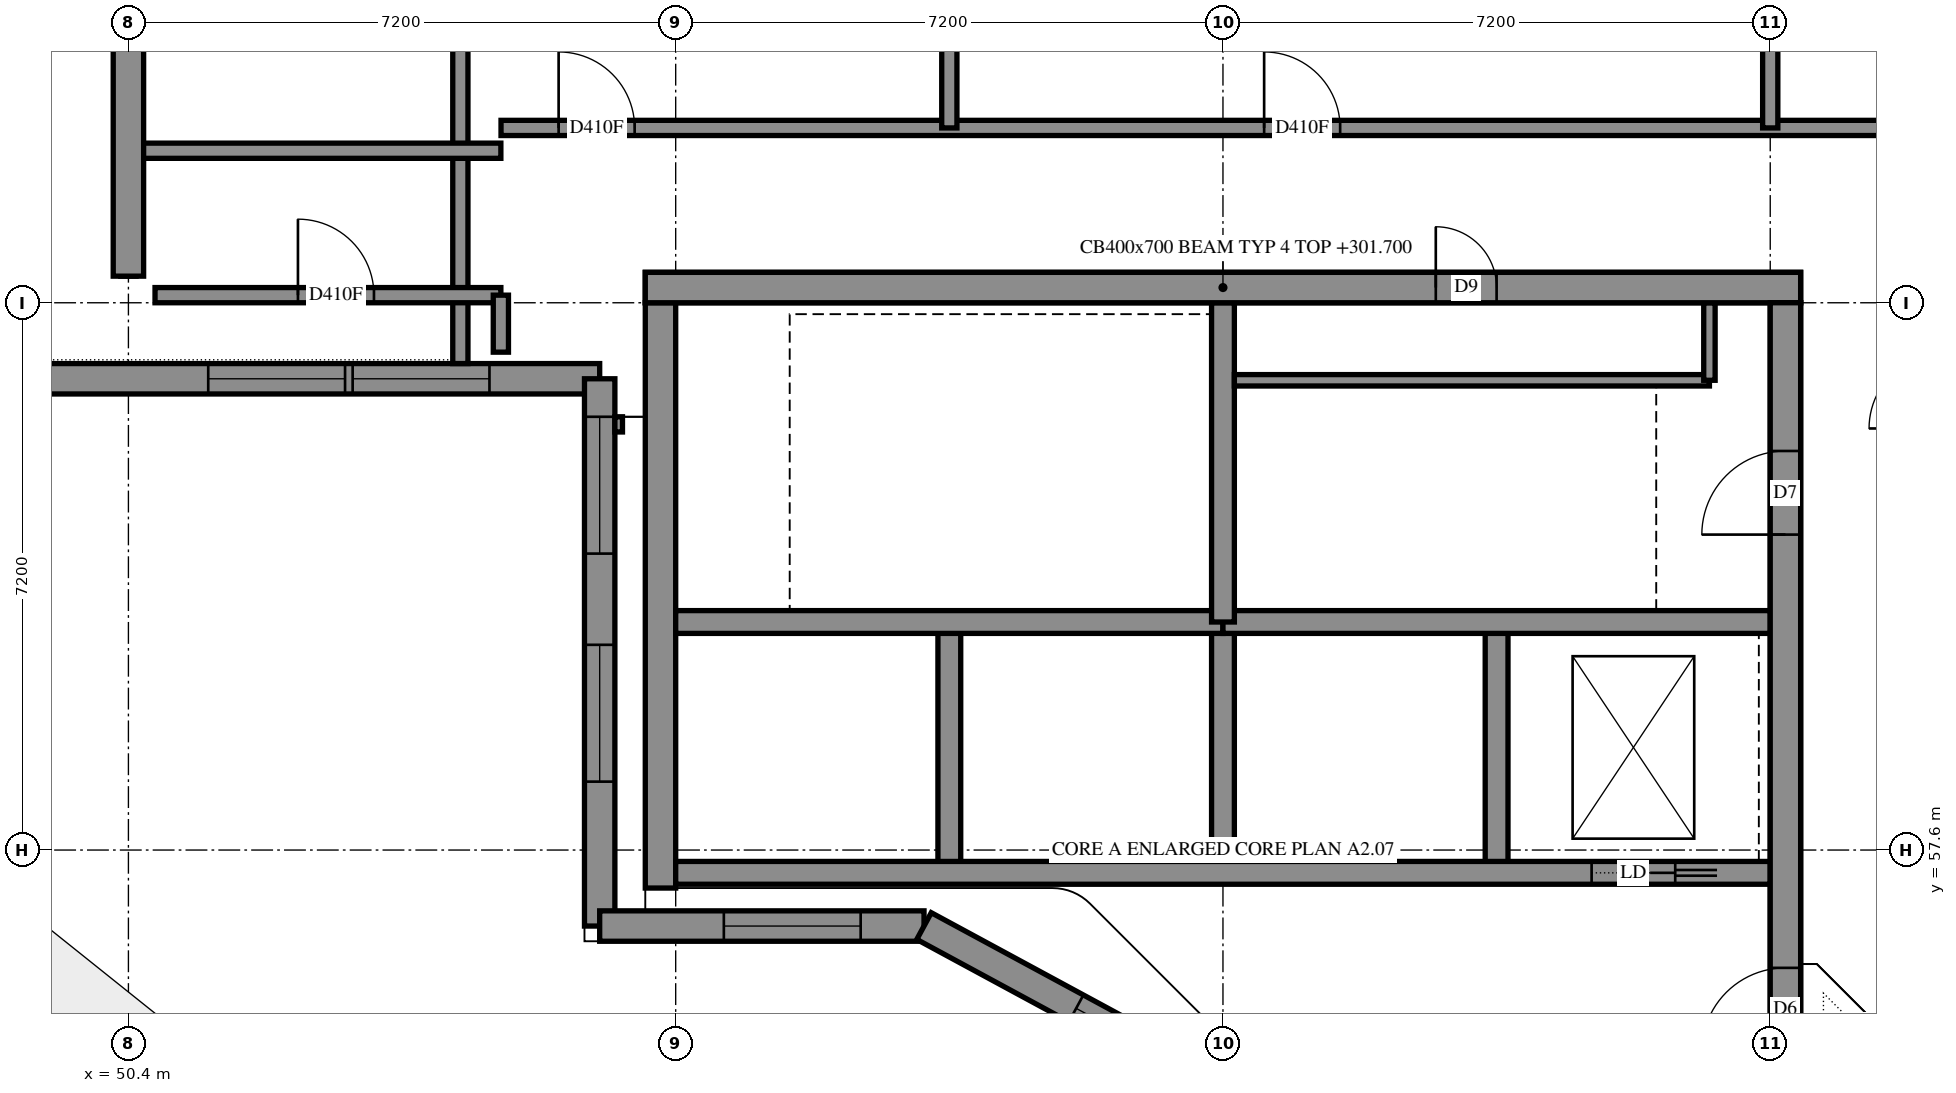
"""IFC4 building model, lengths in metres.
Left out: names, types, materials, properties, quantities, classifications, styles, units other than length and angle.
Written with IfcOpenShell. Run it as: python <this file> out.ifc"""

import sys

from ifc_helpers import new_model, si_unit, direction, frame, frame_2d, origin, place, context, subcontext, project, spatial, polyline, rectangle, outline, extrude, element, fill, save


model = new_model("IFC4")
c1 = context("Model", 3, precision=1e-05, world=origin(), true_north=direction((0.0, 1.0)))
c2 = subcontext(c1, "Body", "Model", "MODEL_VIEW")
j1 = project(units=[si_unit("LENGTHUNIT", "METRE"), si_unit("PLANEANGLEUNIT", "RADIAN")], contexts=[c1])
p1 = place(None, origin())
s1 = spatial("IfcSite", under=j1, at=p1, CompositionType="ELEMENT")
p2 = place(p1, origin())
s2 = spatial("IfcBuilding", under=s1, at=p2, CompositionType="ELEMENT")
p3 = place(p2, frame((0.0, 0.0, 298.2)))
s3 = spatial("IfcBuildingStorey", under=s2, at=p3, CompositionType="ELEMENT", Elevation=298.2)
p4 = place(p3, frame((57.2, 65.0, -0.3), z_axis=(0.0, 0.0, 1.0), x_axis=(1.0, 0.0, 0.0)))
e1 = element("IfcWall", 1, at=p4, inside=s3, PredefinedType="SHEAR", context=c2, shape_type="SweptSolid", body=[
    extrude(outline(polyline([(0.0, 0.0), (15.2, 0.0), (15.2, 3.1), (0.0, 3.1), (0.0, 0.0)])), frame((0.0, 0.2, 0.0), z_axis=(0.0, -1.0, 0.0), x_axis=(1.0, 0.0, 0.0)), (0.0, 0.0, 1.0), 0.4),
])
p5 = place(p4, frame((10.4, 0.0, 0.3)))
e2 = element("IfcOpeningElement", 2, at=p5, cuts=e1, PredefinedType="OPENING", context=c2, shape_type="SweptSolid", body=[
    extrude(rectangle(XDim=0.8, YDim=2.1, at=frame_2d((0.4, 1.05))), frame((0.0, 0.21, 0.0), z_axis=(0.0, -1.0, 0.0), x_axis=(1.0, 0.0, 0.0)), (0.0, 0.0, 1.0), 0.42),
])
p6 = place(p3, frame((57.4, 57.1, -0.3), z_axis=(0.0, 0.0, 1.0), x_axis=(0.0, 1.0, 0.0)))
e3 = element("IfcWall", 3, at=p6, inside=s3, PredefinedType="SHEAR", context=c2, shape_type="SweptSolid", body=[
    extrude(outline(polyline([(0.0, 0.0), (7.7, 0.0), (7.7, 3.1), (0.0, 3.1), (0.0, 0.0)])), frame((0.0, 0.2, 0.0), z_axis=(0.0, -1.0, 0.0), x_axis=(1.0, 0.0, 0.0)), (0.0, 0.0, 1.0), 0.4),
])
p7 = place(p3, frame((72.2, 50.4, -0.3), z_axis=(0.0, 0.0, 1.0), x_axis=(0.0, 1.0, 0.0)))
e4 = element("IfcWall", 4, at=p7, inside=s3, PredefinedType="SHEAR", context=c2, shape_type="SweptSolid", body=[
    extrude(outline(polyline([(0.0, 0.0), (14.4, 0.0), (14.4, 3.1), (0.0, 3.1), (0.0, 0.0)])), frame((0.0, 0.2, 0.0), z_axis=(0.0, -1.0, 0.0), x_axis=(1.0, 0.0, 0.0)), (0.0, 0.0, 1.0), 0.4),
])
p8 = place(p7, frame((4.55, 0.0, 0.3)))
e5 = element("IfcOpeningElement", 5, at=p8, cuts=e4, PredefinedType="OPENING", context=c2, shape_type="SweptSolid", body=[
    extrude(rectangle(XDim=1.1, YDim=2.1, at=frame_2d((0.55, 1.05))), frame((0.0, 0.21, 0.0), z_axis=(0.0, -1.0, 0.0), x_axis=(1.0, 0.0, 0.0)), (0.0, 0.0, 1.0), 0.42),
])
p9 = place(p7, frame((11.35, 0.0, 0.3)))
e6 = element("IfcOpeningElement", 6, at=p9, cuts=e4, PredefinedType="OPENING", context=c2, shape_type="SweptSolid", body=[
    extrude(rectangle(XDim=1.1, YDim=2.1, at=frame_2d((0.55, 1.05))), frame((0.0, 0.21, 0.0), z_axis=(0.0, -1.0, 0.0), x_axis=(1.0, 0.0, 0.0)), (0.0, 0.0, 1.0), 0.42),
])
for number, where, z_axis, x_axis in (
    (7, (61.2, 57.3, 0.0), (0.0, 0.0, 1.0), (0.0, 1.0, 0.0)),
    (8, (64.8, 57.3, 0.0), (0.0, 0.0, 1.0), (0.0, 1.0, 0.0)),
    (9, (68.4, 57.3, 0.0), (0.0, 0.0, 1.0), (0.0, 1.0, 0.0)),
):
    element("IfcWall", number, at=place(p3, frame(where, z_axis=z_axis, x_axis=x_axis)), inside=s3, PredefinedType="SOLIDWALL", context=c2, shape_type="SweptSolid", body=[
        extrude(outline(polyline([(0.0, 0.0), (3.3, 0.0), (3.3, 3.5), (0.0, 3.5), (0.0, 0.0)])), frame((0.0, 0.15, 0.0), z_axis=(0.0, -1.0, 0.0), x_axis=(1.0, 0.0, 0.0)), (0.0, 0.0, 1.0), 0.3),
    ])
p10 = place(p3, frame((57.6, 57.3, 0.0), z_axis=(0.0, 0.0, 1.0), x_axis=(1.0, 0.0, 0.0)))
e10 = element("IfcWall", 10, at=p10, inside=s3, PredefinedType="SOLIDWALL", context=c2, shape_type="SweptSolid", body=[
    extrude(outline(polyline([(0.0, 0.0), (14.4, 0.0), (14.4, 3.5), (0.0, 3.5), (0.0, 0.0)])), frame((0.0, 0.15, 0.0), z_axis=(0.0, -1.0, 0.0), x_axis=(1.0, 0.0, 0.0)), (0.0, 0.0, 1.0), 0.3),
])
p11 = place(p10, frame((12.05, 0.0, 0.0)))
e11 = element("IfcOpeningElement", 11, at=p11, cuts=e10, PredefinedType="OPENING", context=c2, shape_type="SweptSolid", body=[
    extrude(rectangle(XDim=1.1, YDim=2.1, at=frame_2d((0.55, 1.05))), frame((0.0, 0.16, 0.0), z_axis=(0.0, -1.0, 0.0), x_axis=(1.0, 0.0, 0.0)), (0.0, 0.0, 1.0), 0.32),
])
for number, where, z_axis, x_axis in (
    (12, (57.6, 60.6, 0.0), (0.0, 0.0, 1.0), (1.0, 0.0, 0.0)),
    (13, (64.8, 60.6, 0.0), (0.0, 0.0, 1.0), (1.0, 0.0, 0.0)),
):
    element("IfcWall", number, at=place(p3, frame(where, z_axis=z_axis, x_axis=x_axis)), inside=s3, PredefinedType="SOLIDWALL", context=c2, shape_type="SweptSolid", body=[
        extrude(outline(polyline([(0.0, 0.0), (7.2, 0.0), (7.2, 3.5), (0.0, 3.5), (0.0, 0.0)])), frame((0.0, 0.15, 0.0), z_axis=(0.0, -1.0, 0.0), x_axis=(1.0, 0.0, 0.0)), (0.0, 0.0, 1.0), 0.3),
    ])
p12 = place(p3, frame((64.8, 60.6, 0.0), z_axis=(0.0, 0.0, 1.0), x_axis=(0.0, 1.0, 0.0)))
e14 = element("IfcWall", 14, at=p12, inside=s3, PredefinedType="SOLIDWALL", context=c2, shape_type="SweptSolid", body=[
    extrude(outline(polyline([(0.0, 0.0), (4.2, 0.0), (4.2, 3.5), (0.0, 3.5), (0.0, 0.0)])), frame((0.0, 0.15, 0.0), z_axis=(0.0, -1.0, 0.0), x_axis=(1.0, 0.0, 0.0)), (0.0, 0.0, 1.0), 0.3),
])
p13 = place(p3, frame((48.167, 63.8, 0.0), z_axis=(0.0, 0.0, 1.0), x_axis=(1.0, 0.0, 0.0)))
e15 = element("IfcWall", 15, at=p13, inside=s3, PredefinedType="SOLIDWALL", context=c2, shape_type="SweptSolid", body=[
    extrude(outline(polyline([(-0.2, -0.2), (8.233, -0.2), (8.233, 0.2), (0.2, 0.2), (-0.2, -0.2)])), origin(), (0.0, 0.0, 1.0), 3.5),
])
p14 = place(p13, frame((3.283, 0.0, 0.7)))
e16 = element("IfcOpeningElement", 16, at=p14, cuts=e15, PredefinedType="OPENING", context=c2, shape_type="SweptSolid", body=[
    extrude(rectangle(XDim=1.8, YDim=2.2, at=frame_2d((0.9, 1.1))), frame((0.0, 0.21, 0.0), z_axis=(0.0, -1.0, 0.0), x_axis=(1.0, 0.0, 0.0)), (0.0, 0.0, 1.0), 0.42),
])
p15 = place(p13, frame((5.183, 0.0, 0.7)))
e17 = element("IfcOpeningElement", 17, at=p15, cuts=e15, PredefinedType="OPENING", context=c2, shape_type="SweptSolid", body=[
    extrude(rectangle(XDim=1.8, YDim=2.2, at=frame_2d((0.9, 1.1))), frame((0.0, 0.21, 0.0), z_axis=(0.0, -1.0, 0.0), x_axis=(1.0, 0.0, 0.0)), (0.0, 0.0, 1.0), 0.42),
])
p16 = place(p3, frame((56.6, 63.8, 0.0), z_axis=(0.0, 0.0, 1.0), x_axis=(0.0, -1.0, 0.0)))
e18 = element("IfcWall", 18, at=p16, inside=s3, PredefinedType="SOLIDWALL", context=c2, shape_type="SweptSolid", body=[
    extrude(outline(polyline([(-0.2, -0.2), (7.4, -0.2), (7.0, 0.2), (-0.2, 0.2), (-0.2, -0.2)])), origin(), (0.0, 0.0, 1.0), 3.5),
])
p17 = place(p16, frame((0.5, 0.0, 0.7)))
e19 = element("IfcOpeningElement", 19, at=p17, cuts=e18, PredefinedType="OPENING", context=c2, shape_type="SweptSolid", body=[
    extrude(rectangle(XDim=1.8, YDim=2.2, at=frame_2d((0.9, 1.1))), frame((0.0, 0.21, 0.0), z_axis=(0.0, -1.0, 0.0), x_axis=(1.0, 0.0, 0.0)), (0.0, 0.0, 1.0), 0.42),
])
p18 = place(p16, frame((3.5, 0.0, 0.7)))
e20 = element("IfcOpeningElement", 20, at=p18, cuts=e18, PredefinedType="OPENING", context=c2, shape_type="SweptSolid", body=[
    extrude(rectangle(XDim=1.8, YDim=2.2, at=frame_2d((0.9, 1.1))), frame((0.0, 0.21, 0.0), z_axis=(0.0, -1.0, 0.0), x_axis=(1.0, 0.0, 0.0)), (0.0, 0.0, 1.0), 0.42),
])
p19 = place(p3, frame((56.6, 56.6, 0.0), z_axis=(0.0, 0.0, 1.0), x_axis=(1.0, 0.0, 0.0)))
e21 = element("IfcWall", 21, at=p19, inside=s3, PredefinedType="SOLIDWALL", context=c2, shape_type="SweptSolid", body=[
    extrude(outline(polyline([(-0.2, -0.2), (4.216, -0.2), (4.318, 0.2), (0.2, 0.2), (-0.2, -0.2)])), origin(), (0.0, 0.0, 1.0), 3.5),
])
p20 = place(p19, frame((1.633, 0.0, 0.7)))
e22 = element("IfcOpeningElement", 22, at=p20, cuts=e21, PredefinedType="OPENING", context=c2, shape_type="SweptSolid", body=[
    extrude(rectangle(XDim=1.8, YDim=2.2, at=frame_2d((0.9, 1.1))), frame((0.0, 0.21, 0.0), z_axis=(0.0, -1.0, 0.0), x_axis=(1.0, 0.0, 0.0)), (0.0, 0.0, 1.0), 0.42),
])
p21 = place(p3, frame((60.867, 56.6, 0.0), z_axis=(0.0, 0.0, 1.0), x_axis=(0.8795817564, -0.4757477628, 0.0)))
e23 = element("IfcWall", 23, at=p21, inside=s3, PredefinedType="SOLIDWALL", context=c2, shape_type="SweptSolid", body=[
    extrude(outline(polyline([(0.051, -0.2), (4.358, -0.2), (4.416, 0.2), (-0.051, 0.2), (0.051, -0.2)])), origin(), (0.0, 0.0, 1.0), 3.5),
])
p22 = place(p21, frame((2.276, 0.0, 0.7)))
e24 = element("IfcOpeningElement", 24, at=p22, cuts=e23, PredefinedType="OPENING", context=c2, shape_type="SweptSolid", body=[
    extrude(rectangle(XDim=1.8, YDim=2.2, at=frame_2d((0.9, 1.1))), frame((0.0, 0.21, 0.0), z_axis=(0.0, -1.0, 0.0), x_axis=(1.0, 0.0, 0.0)), (0.0, 0.0, 1.0), 0.42),
])
p23 = place(p3, frame((54.767, 64.0, 0.0), z_axis=(0.0, 0.0, 1.0), x_axis=(0.0, 1.0, 0.0)))
e25 = element("IfcWall", 25, at=p23, inside=s3, PredefinedType="PARAPET", context=c2, shape_type="SweptSolid", body=[
    extrude(outline(polyline([(0.0, -0.1), (8.8, -0.1), (8.8, 0.1), (0.0, 0.1), (0.0, -0.1)])), origin(), (0.0, 0.0, 1.0), 0.25),
])
p24 = place(p3, frame((56.9, 63.2, 0.0), z_axis=(0.0, 0.0, 1.0), x_axis=(-1.0, 0.0, 0.0)))
e26 = element("IfcWall", 26, at=p24, inside=s3, PredefinedType="PARAPET", context=c2, shape_type="SweptSolid", body=[
    extrude(outline(polyline([(0.0, -0.1), (0.1, -0.1), (0.1, 0.1), (0.0, 0.1), (0.0, -0.1)])), origin(), (0.0, 0.0, 1.0), 0.25),
])
p25 = place(p3, frame((64.95, 63.78, 0.0), z_axis=(0.0, 0.0, 1.0), x_axis=(1.0, 0.0, 0.0)))
e27 = element("IfcWall", 27, at=p25, inside=s3, PredefinedType="PARTITIONING", context=c2, shape_type="SweptSolid", body=[
    extrude(outline(polyline([(0.0, 0.0), (6.25, 0.0), (6.25, 3.5), (0.0, 3.5), (0.0, 0.0)])), frame((0.0, 0.075, 0.0), z_axis=(0.0, -1.0, 0.0), x_axis=(1.0, 0.0, 0.0)), (0.0, 0.0, 1.0), 0.15),
])
p26 = place(p3, frame((71.2, 63.78, 0.0), z_axis=(0.0, 0.0, 1.0), x_axis=(0.0, 1.0, 0.0)))
e28 = element("IfcWall", 28, at=p26, inside=s3, PredefinedType="PARTITIONING", context=c2, shape_type="SweptSolid", body=[
    extrude(outline(polyline([(0.0, 0.0), (1.02, 0.0), (1.02, 3.5), (0.0, 3.5), (0.0, 0.0)])), frame((0.0, 0.075, 0.0), z_axis=(0.0, -1.0, 0.0), x_axis=(1.0, 0.0, 0.0)), (0.0, 0.0, 1.0), 0.15),
])
p27 = place(p3, frame((55.302, 67.1, 0.0), z_axis=(0.0, 0.0, 1.0), x_axis=(1.0, 0.0, 0.0)))
e29 = element("IfcWall", 29, at=p27, inside=s3, PredefinedType="PARTITIONING", context=c2, shape_type="SweptSolid", body=[
    extrude(rectangle(XDim=18.998, YDim=0.2, at=frame_2d((9.499, 0.0))), origin(), (0.0, 0.0, 1.0), 3.5),
])
p28 = place(p27, frame((0.758, 0.0, 0.0)))
e30 = element("IfcOpeningElement", 30, at=p28, cuts=e29, PredefinedType="OPENING", context=c2, shape_type="SweptSolid", body=[
    extrude(rectangle(XDim=1.0, YDim=2.1, at=frame_2d((0.5, 1.05))), frame((0.0, 0.11, 0.0), z_axis=(0.0, -1.0, 0.0), x_axis=(1.0, 0.0, 0.0)), (0.0, 0.0, 1.0), 0.22),
])
p29 = place(p27, frame((10.04, 0.0, 0.0)))
e31 = element("IfcOpeningElement", 31, at=p29, cuts=e29, PredefinedType="OPENING", context=c2, shape_type="SweptSolid", body=[
    extrude(rectangle(XDim=1.0, YDim=2.1, at=frame_2d((0.5, 1.05))), frame((0.0, 0.11, 0.0), z_axis=(0.0, -1.0, 0.0), x_axis=(1.0, 0.0, 0.0)), (0.0, 0.0, 1.0), 0.22),
])
p30 = place(p3, frame((50.4, 66.8, 0.0), z_axis=(0.0, 0.0, 1.0), x_axis=(1.0, 0.0, 0.0)))
e32 = element("IfcWall", 32, at=p30, inside=s3, PredefinedType="PARTITIONING", context=c2, shape_type="SweptSolid", body=[
    extrude(rectangle(XDim=4.9, YDim=0.2, at=frame_2d((2.45, 0.0))), origin(), (0.0, 0.0, 1.0), 3.5),
])
p31 = place(p3, frame((50.4, 66.8, 0.0), z_axis=(0.0, 0.0, 1.0), x_axis=(0.0, 1.0, 0.0)))
e33 = element("IfcWall", 33, at=p31, inside=s3, PredefinedType="PARTITIONING", context=c2, shape_type="SweptSolid", body=[
    extrude(rectangle(XDim=5.55, YDim=0.2, at=frame_2d((2.775, 0.0))), origin(), (0.0, 0.0, 1.0), 3.5),
])
p32 = place(p3, frame((72.0, 67.1, 0.0), z_axis=(0.0, 0.0, 1.0), x_axis=(0.0, 1.0, 0.0)))
e34 = element("IfcWall", 34, at=p32, inside=s3, PredefinedType="PARTITIONING", context=c2, shape_type="SweptSolid", body=[
    extrude(rectangle(XDim=5.25, YDim=0.2, at=frame_2d((2.625, 0.0))), origin(), (0.0, 0.0, 1.0), 3.5),
])
p33 = place(p3, frame((50.75, 64.9, 0.0), z_axis=(0.0, 0.0, 1.0), x_axis=(1.0, 0.0, 0.0)))
e35 = element("IfcWall", 35, at=p33, inside=s3, PredefinedType="PARTITIONING", context=c2, shape_type="SweptSolid", body=[
    extrude(rectangle(XDim=4.55, YDim=0.2, at=frame_2d((2.275, 0.0))), origin(), (0.0, 0.0, 1.0), 3.5),
])
p34 = place(p33, frame((1.88, 0.0, 0.0)))
e36 = element("IfcOpeningElement", 36, at=p34, cuts=e35, PredefinedType="OPENING", context=c2, shape_type="SweptSolid", body=[
    extrude(rectangle(XDim=1.0, YDim=2.1, at=frame_2d((0.5, 1.05))), frame((0.0, 0.11, 0.0), z_axis=(0.0, -1.0, 0.0), x_axis=(1.0, 0.0, 0.0)), (0.0, 0.0, 1.0), 0.22),
])
p35 = place(p3, frame((50.4, 65.15, 0.0), z_axis=(0.0, 0.0, 1.0), x_axis=(0.0, 1.0, 0.0)))
e37 = element("IfcWall", 37, at=p35, inside=s3, PredefinedType="PARTITIONING", context=c2, shape_type="SweptSolid", body=[
    extrude(rectangle(XDim=1.65, YDim=0.2, at=frame_2d((0.825, 0.0))), origin(), (0.0, 0.0, 1.0), 3.5),
])
p36 = place(p3, frame((55.3, 64.15, 0.0), z_axis=(0.0, 0.0, 1.0), x_axis=(0.0, 1.0, 0.0)))
e38 = element("IfcWall", 38, at=p36, inside=s3, PredefinedType="PARTITIONING", context=c2, shape_type="SweptSolid", body=[
    extrude(rectangle(XDim=0.75, YDim=0.2, at=frame_2d((0.375, 0.0))), origin(), (0.0, 0.0, 1.0), 3.5),
])
p37 = place(p3, frame((61.2, 67.1, 0.0), z_axis=(0.0, 0.0, 1.0), x_axis=(0.0, 1.0, 0.0)))
e39 = element("IfcWall", 39, at=p37, inside=s3, PredefinedType="PARTITIONING", context=c2, shape_type="SweptSolid", body=[
    extrude(outline(polyline([(0.0, -0.1), (5.7, -0.1), (5.7, 0.1), (0.0, 0.1), (0.0, -0.1)])), origin(), (0.0, 0.0, 1.0), 3.5),
])
p38 = place(p14, origin())
e40 = element("IfcWindow", 40, at=p38, inside=s3, PartitioningType="SINGLE_PANEL", PredefinedType="WINDOW", context=c2, shape_type="SweptSolid", body=[
    extrude(rectangle(XDim=1.8, YDim=2.2, at=frame_2d((0.9, 1.1))), frame((0.0, 0.08, 0.0), z_axis=(0.0, -1.0, 0.0), x_axis=(1.0, 0.0, 0.0)), (0.0, 0.0, 1.0), 0.06),
])
fill(e16, e40)
p39 = place(p15, origin())
e41 = element("IfcWindow", 41, at=p39, inside=s3, PartitioningType="SINGLE_PANEL", PredefinedType="WINDOW", context=c2, shape_type="SweptSolid", body=[
    extrude(rectangle(XDim=1.8, YDim=2.2, at=frame_2d((0.9, 1.1))), frame((0.0, 0.08, 0.0), z_axis=(0.0, -1.0, 0.0), x_axis=(1.0, 0.0, 0.0)), (0.0, 0.0, 1.0), 0.06),
])
fill(e17, e41)
p40 = place(p17, origin())
e42 = element("IfcWindow", 42, at=p40, inside=s3, PartitioningType="SINGLE_PANEL", PredefinedType="WINDOW", context=c2, shape_type="SweptSolid", body=[
    extrude(rectangle(XDim=1.8, YDim=2.2, at=frame_2d((0.9, 1.1))), frame((0.0, 0.08, 0.0), z_axis=(0.0, -1.0, 0.0), x_axis=(1.0, 0.0, 0.0)), (0.0, 0.0, 1.0), 0.06),
])
fill(e19, e42)
p41 = place(p18, origin())
e43 = element("IfcWindow", 43, at=p41, inside=s3, PartitioningType="SINGLE_PANEL", PredefinedType="WINDOW", context=c2, shape_type="SweptSolid", body=[
    extrude(rectangle(XDim=1.8, YDim=2.2, at=frame_2d((0.9, 1.1))), frame((0.0, 0.08, 0.0), z_axis=(0.0, -1.0, 0.0), x_axis=(1.0, 0.0, 0.0)), (0.0, 0.0, 1.0), 0.06),
])
fill(e20, e43)
p42 = place(p20, origin())
e44 = element("IfcWindow", 44, at=p42, inside=s3, PartitioningType="SINGLE_PANEL", PredefinedType="WINDOW", context=c2, shape_type="SweptSolid", body=[
    extrude(rectangle(XDim=1.8, YDim=2.2, at=frame_2d((0.9, 1.1))), frame((0.0, 0.08, 0.0), z_axis=(0.0, -1.0, 0.0), x_axis=(1.0, 0.0, 0.0)), (0.0, 0.0, 1.0), 0.06),
])
fill(e22, e44)
p43 = place(p22, origin())
e45 = element("IfcWindow", 45, at=p43, inside=s3, PartitioningType="SINGLE_PANEL", PredefinedType="WINDOW", context=c2, shape_type="SweptSolid", body=[
    extrude(rectangle(XDim=1.8, YDim=2.2, at=frame_2d((0.9, 1.1))), frame((0.0, 0.08, 0.0), z_axis=(0.0, -1.0, 0.0), x_axis=(1.0, 0.0, 0.0)), (0.0, 0.0, 1.0), 0.06),
])
fill(e24, e45)
p44 = place(p5, origin())
e46 = element("IfcDoor", 46, at=p44, inside=s3, OperationType="SINGLE_SWING_RIGHT", PredefinedType="DOOR", context=c2, shape_type="SweptSolid", body=[
    extrude(rectangle(XDim=0.8, YDim=2.1, at=frame_2d((0.4, 1.05))), frame((0.0, 0.025, 0.0), z_axis=(0.0, -1.0, 0.0), x_axis=(1.0, 0.0, 0.0)), (0.0, 0.0, 1.0), 0.05),
])
fill(e2, e46)
p45 = place(p8, origin())
e47 = element("IfcDoor", 47, at=p45, inside=s3, OperationType="DOUBLE_DOOR_SINGLE_SWING", PredefinedType="DOOR", context=c2, shape_type="SweptSolid", body=[
    extrude(rectangle(XDim=1.1, YDim=2.1, at=frame_2d((0.55, 1.05))), frame((0.0, 0.025, 0.0), z_axis=(0.0, -1.0, 0.0), x_axis=(1.0, 0.0, 0.0)), (0.0, 0.0, 1.0), 0.05),
])
fill(e5, e47)
p46 = place(p9, origin())
e48 = element("IfcDoor", 48, at=p46, inside=s3, OperationType="SINGLE_SWING_RIGHT", PredefinedType="DOOR", context=c2, shape_type="SweptSolid", body=[
    extrude(rectangle(XDim=1.1, YDim=2.1, at=frame_2d((0.55, 1.05))), frame((0.0, 0.025, 0.0), z_axis=(0.0, -1.0, 0.0), x_axis=(1.0, 0.0, 0.0)), (0.0, 0.0, 1.0), 0.05),
])
fill(e6, e48)
p47 = place(p11, origin())
e49 = element("IfcDoor", 49, at=p47, inside=s3, OperationType="SLIDING_TO_RIGHT", PredefinedType="DOOR", context=c2, shape_type="SweptSolid", body=[
    extrude(rectangle(XDim=1.1, YDim=2.1, at=frame_2d((0.55, 1.05))), frame((0.0, 0.025, 0.0), z_axis=(0.0, -1.0, 0.0), x_axis=(1.0, 0.0, 0.0)), (0.0, 0.0, 1.0), 0.05),
])
fill(e11, e49)
p48 = place(p34, origin())
e50 = element("IfcDoor", 50, at=p48, inside=s3, OperationType="SINGLE_SWING_RIGHT", PredefinedType="DOOR", context=c2, shape_type="SweptSolid", body=[
    extrude(rectangle(XDim=1.0, YDim=2.1, at=frame_2d((0.5, 1.05))), frame((0.0, 0.025, 0.0), z_axis=(0.0, -1.0, 0.0), x_axis=(1.0, 0.0, 0.0)), (0.0, 0.0, 1.0), 0.05),
])
fill(e36, e50)
p49 = place(p28, origin())
e51 = element("IfcDoor", 51, at=p49, inside=s3, OperationType="SINGLE_SWING_RIGHT", PredefinedType="DOOR", context=c2, shape_type="SweptSolid", body=[
    extrude(rectangle(XDim=1.0, YDim=2.1, at=frame_2d((0.5, 1.05))), frame((0.0, 0.025, 0.0), z_axis=(0.0, -1.0, 0.0), x_axis=(1.0, 0.0, 0.0)), (0.0, 0.0, 1.0), 0.05),
])
fill(e30, e51)
p50 = place(p29, origin())
e52 = element("IfcDoor", 52, at=p50, inside=s3, OperationType="SINGLE_SWING_LEFT", PredefinedType="DOOR", context=c2, shape_type="SweptSolid", body=[
    extrude(rectangle(XDim=1.0, YDim=2.1, at=frame_2d((0.5, 1.05))), frame((0.0, 0.025, 0.0), z_axis=(0.0, -1.0, 0.0), x_axis=(1.0, 0.0, 0.0)), (0.0, 0.0, 1.0), 0.05),
])
fill(e31, e52)
save(model, sys.argv[1])
